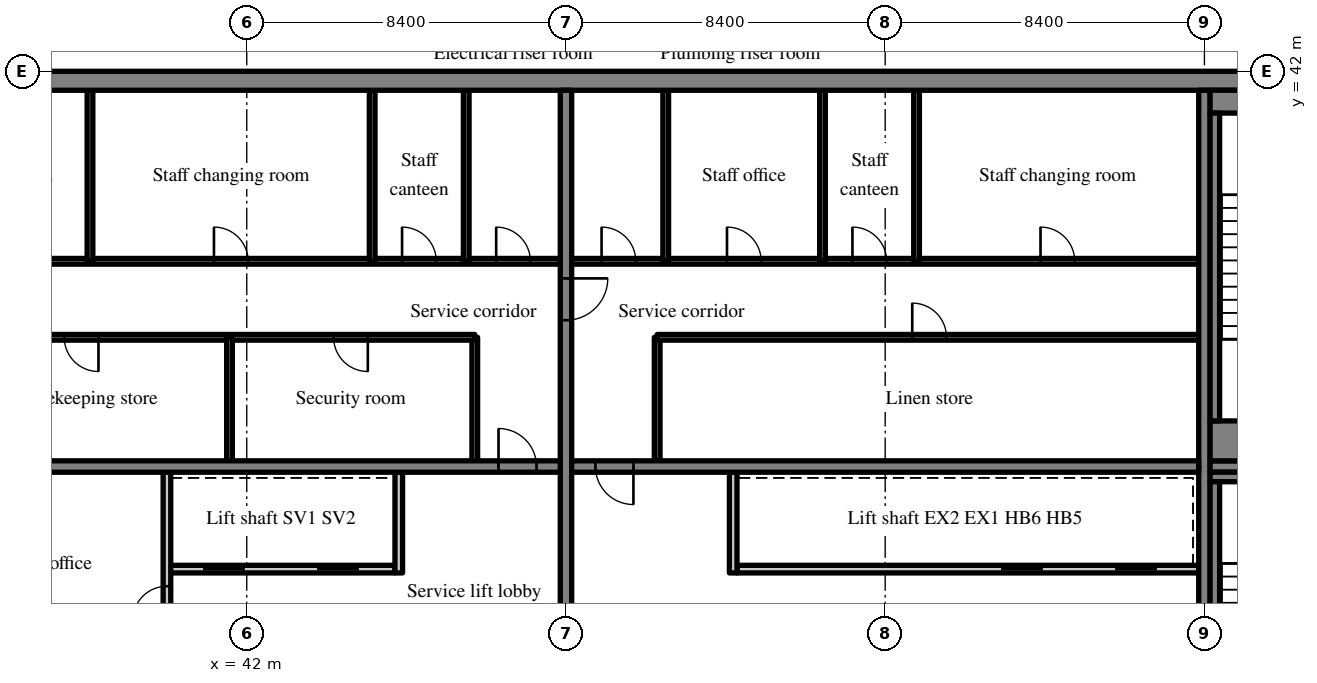
"""IFC4 building model, lengths in metres.
Left out: names, types, materials, properties, quantities, classifications, styles, units other than length and angle.
Written with IfcOpenShell. Run it as: python <this file> out.ifc"""

import sys

from ifc_helpers import new_model, si_unit, direction, frame, frame_2d, origin, place, context, subcontext, project, spatial, rectangle, extrude, source, transform, mapped, element, fill, save


model = new_model("IFC4")
c1 = context("Model", 3, precision=1e-05, world=origin(), true_north=direction((0.0, 1.0)))
c2 = subcontext(c1, "Body", "Model", "MODEL_VIEW")
j1 = project(units=[si_unit("LENGTHUNIT", "METRE"), si_unit("PLANEANGLEUNIT", "RADIAN")], contexts=[c1])
p1 = place(None, origin())
s1 = spatial("IfcSite", under=j1, at=p1, CompositionType="ELEMENT")
p2 = place(p1, origin())
s2 = spatial("IfcBuilding", under=s1, at=p2, CompositionType="ELEMENT")
p3 = place(p2, frame((0.0, 0.0, 305.7)))
s3 = spatial("IfcBuildingStorey", under=s2, at=p3, CompositionType="ELEMENT", Elevation=305.7)
m1 = source(origin(), c2, "Body", "SweptSolid", [
    extrude(rectangle(XDim=50.4, YDim=0.5, at=frame_2d((25.2, 0.0))), origin(), (0.0, 0.0, 1.0), 3.72),
])
p4 = place(p3, frame((25.2, 41.75, 0.0), z_axis=(0.0, 0.0, 1.0), x_axis=(1.0, 0.0, 0.0)))
e1 = element("IfcWall", 1, at=p4, inside=s3, PredefinedType="SHEAR", context=c2, shape_type="MappedRepresentation", body=[
    mapped(m1, transform((0.0, 0.0, 0.0), scale=1.0)),
])
m2 = source(origin(), c2, "Body", "SweptSolid", [
    extrude(rectangle(XDim=19.0, YDim=0.3, at=frame_2d((9.5, 0.0))), origin(), (0.0, 0.0, 1.0), 3.72),
])
p5 = place(p3, frame((50.4, 22.5, 0.0), z_axis=(0.0, 0.0, 1.0), x_axis=(0.0, 1.0, 0.0)))
e2 = element("IfcWall", 2, at=p5, inside=s3, PredefinedType="SHEAR", context=c2, shape_type="MappedRepresentation", body=[
    mapped(m2, transform((0.0, 0.0, 0.0), scale=1.0)),
])
m3 = source(origin(), c2, "Body", "SweptSolid", [
    extrude(rectangle(XDim=1.1, YDim=2.1, at=frame_2d((0.55, 1.05))), frame((0.0, 0.16, 0.0), z_axis=(0.0, -1.0, 0.0), x_axis=(1.0, 0.0, 0.0)), (0.0, 0.0, 1.0), 0.32),
])
p6 = place(p5, frame((12.95, 0.0, 0.0)))
e3 = element("IfcOpeningElement", 3, at=p6, cuts=e2, PredefinedType="OPENING", context=c2, shape_type="MappedRepresentation", body=[
    mapped(m3, transform((0.0, 0.0, 0.0), scale=1.0)),
])
p7 = place(p3, frame((67.2, 22.5, 0.0), z_axis=(0.0, 0.0, 1.0), x_axis=(0.0, 1.0, 0.0)))
e4 = element("IfcWall", 4, at=p7, inside=s3, PredefinedType="SHEAR", context=c2, shape_type="MappedRepresentation", body=[
    mapped(m2, transform((0.0, 0.0, 0.0), scale=1.0)),
])
m4 = source(origin(), c2, "Body", "SweptSolid", [
    extrude(rectangle(XDim=16.5, YDim=0.3, at=frame_2d((8.25, 0.0))), origin(), (0.0, 0.0, 1.0), 3.72),
])
p8 = place(p3, frame((33.75, 31.6, 0.0), z_axis=(0.0, 0.0, 1.0), x_axis=(1.0, 0.0, 0.0)))
e5 = element("IfcWall", 5, at=p8, inside=s3, PredefinedType="SHEAR", context=c2, shape_type="MappedRepresentation", body=[
    mapped(m4, transform((0.0, 0.0, 0.0), scale=1.0)),
])
m5 = source(origin(), c2, "Body", "SweptSolid", [
    extrude(rectangle(XDim=1.0, YDim=2.1, at=frame_2d((0.5, 1.05))), frame((0.0, 0.16, 0.0), z_axis=(0.0, -1.0, 0.0), x_axis=(1.0, 0.0, 0.0)), (0.0, 0.0, 1.0), 0.32),
])
p9 = place(p8, frame((14.875, 0.0, 0.0)))
e6 = element("IfcOpeningElement", 6, at=p9, cuts=e5, PredefinedType="OPENING", context=c2, shape_type="MappedRepresentation", body=[
    mapped(m5, transform((0.0, 0.0, 0.0), scale=1.0)),
])
p10 = place(p3, frame((50.55, 31.6, 0.0), z_axis=(0.0, 0.0, 1.0), x_axis=(1.0, 0.0, 0.0)))
e7 = element("IfcWall", 7, at=p10, inside=s3, PredefinedType="SHEAR", context=c2, shape_type="MappedRepresentation", body=[
    mapped(m4, transform((0.0, 0.0, 0.0), scale=1.0)),
])
p11 = place(p10, frame((0.625, 0.0, 0.0)))
e8 = element("IfcOpeningElement", 8, at=p11, cuts=e7, PredefinedType="OPENING", context=c2, shape_type="MappedRepresentation", body=[
    mapped(m5, transform((0.0, 0.0, 0.0), scale=1.0)),
])
m6 = source(origin(), c2, "Body", "SweptSolid", [
    extrude(rectangle(XDim=7.75, YDim=0.3, at=frame_2d((3.875, 0.0))), origin(), (0.0, 0.0, 1.0), 3.72),
])
p12 = place(p3, frame((67.35, 31.6, 0.0), z_axis=(0.0, 0.0, 1.0), x_axis=(1.0, 0.0, 0.0)))
e9 = element("IfcWall", 9, at=p12, inside=s3, PredefinedType="SHEAR", context=c2, shape_type="MappedRepresentation", body=[
    mapped(m6, transform((0.0, 0.0, 0.0), scale=1.0)),
])
p13 = place(p12, frame((5.875, 0.0, 0.0)))
e10 = element("IfcOpeningElement", 10, at=p13, cuts=e9, PredefinedType="OPENING", context=c2, shape_type="MappedRepresentation", body=[
    mapped(m3, transform((0.0, 0.0, 0.0), scale=1.0)),
])
m7 = source(origin(), c2, "Body", "SweptSolid", [
    extrude(rectangle(XDim=6.0, YDim=0.2, at=frame_2d((3.0, 0.0))), origin(), (0.0, 0.0, 1.0), 3.72),
])
p14 = place(p3, frame((39.9, 28.9, 0.0), z_axis=(0.0, 0.0, 1.0), x_axis=(1.0, 0.0, 0.0)))
e11 = element("IfcWall", 11, at=p14, inside=s3, PredefinedType="SOLIDWALL", context=c2, shape_type="MappedRepresentation", body=[
    mapped(m7, transform((0.0, 0.0, 0.0), scale=1.0)),
])
m8 = source(origin(), c2, "Body", "SweptSolid", [
    extrude(rectangle(XDim=1.1, YDim=2.1, at=frame_2d((0.55, 1.05))), frame((0.0, 0.11, 0.0), z_axis=(0.0, -1.0, 0.0), x_axis=(1.0, 0.0, 0.0)), (0.0, 0.0, 1.0), 0.22),
])
p15 = place(p14, frame((0.95, 0.0, 0.0)))
e12 = element("IfcOpeningElement", 12, at=p15, cuts=e11, PredefinedType="OPENING", context=c2, shape_type="MappedRepresentation", body=[
    mapped(m8, transform((0.0, 0.0, 0.0), scale=1.0)),
])
p16 = place(p14, frame((3.95, 0.0, 0.0)))
e13 = element("IfcOpeningElement", 13, at=p16, cuts=e11, PredefinedType="OPENING", context=c2, shape_type="MappedRepresentation", body=[
    mapped(m8, transform((0.0, 0.0, 0.0), scale=1.0)),
])
m9 = source(origin(), c2, "Body", "SweptSolid", [
    extrude(rectangle(XDim=8.95, YDim=0.2, at=frame_2d((4.475, 0.0))), origin(), (0.0, 0.0, 1.0), 3.72),
])
p17 = place(p3, frame((39.9, 22.5, 0.0), z_axis=(0.0, 0.0, 1.0), x_axis=(0.0, 1.0, 0.0)))
e14 = element("IfcWall", 14, at=p17, inside=s3, PredefinedType="PARTITIONING", context=c2, shape_type="MappedRepresentation", body=[
    mapped(m9, transform((0.0, 0.0, 0.0), scale=1.0)),
])
m10 = source(origin(), c2, "Body", "SweptSolid", [
    extrude(rectangle(XDim=0.9, YDim=2.1, at=frame_2d((0.45, 1.05))), frame((0.0, 0.11, 0.0), z_axis=(0.0, -1.0, 0.0), x_axis=(1.0, 0.0, 0.0)), (0.0, 0.0, 1.0), 0.22),
])
p18 = place(p17, frame((5.05, 0.0, 0.0)))
e15 = element("IfcOpeningElement", 15, at=p18, cuts=e14, PredefinedType="OPENING", context=c2, shape_type="MappedRepresentation", body=[
    mapped(m10, transform((0.0, 0.0, 0.0), scale=1.0)),
])
m11 = source(origin(), c2, "Body", "SweptSolid", [
    extrude(rectangle(XDim=2.65, YDim=0.2, at=frame_2d((1.325, 0.0))), origin(), (0.0, 0.0, 1.0), 3.72),
])
p19 = place(p3, frame((46.0, 28.8, 0.0), z_axis=(0.0, 0.0, 1.0), x_axis=(0.0, 1.0, 0.0)))
e16 = element("IfcWall", 16, at=p19, inside=s3, PredefinedType="SOLIDWALL", context=c2, shape_type="MappedRepresentation", body=[
    mapped(m11, transform((0.0, 0.0, 0.0), scale=1.0)),
])
m12 = source(origin(), c2, "Body", "SweptSolid", [
    extrude(rectangle(XDim=3.25, YDim=0.15, at=frame_2d((1.625, 0.0))), origin(), (0.0, 0.0, 1.0), 3.72),
])
p20 = place(p3, frame((48.0, 31.75, 0.0), z_axis=(0.0, 0.0, 1.0), x_axis=(0.0, 1.0, 0.0)))
e17 = element("IfcWall", 17, at=p20, inside=s3, PredefinedType="PARTITIONING", context=c2, shape_type="MappedRepresentation", body=[
    mapped(m12, transform((0.0, 0.0, 0.0), scale=1.0)),
])
m13 = source(origin(), c2, "Body", "SweptSolid", [
    extrude(rectangle(XDim=14.25, YDim=0.15, at=frame_2d((7.125, 0.0))), origin(), (0.0, 0.0, 1.0), 3.72),
])
p21 = place(p3, frame((33.75, 35.0, 0.0), z_axis=(0.0, 0.0, 1.0), x_axis=(1.0, 0.0, 0.0)))
e18 = element("IfcWall", 18, at=p21, inside=s3, PredefinedType="PARTITIONING", context=c2, shape_type="MappedRepresentation", body=[
    mapped(m13, transform((0.0, 0.0, 0.0), scale=1.0)),
])
m14 = source(origin(), c2, "Body", "SweptSolid", [
    extrude(rectangle(XDim=0.9, YDim=2.1, at=frame_2d((0.45, 1.05))), frame((0.0, 0.085, 0.0), z_axis=(0.0, -1.0, 0.0), x_axis=(1.0, 0.0, 0.0)), (0.0, 0.0, 1.0), 0.17),
])
p22 = place(p21, frame((3.448, 0.0, 0.0)))
e19 = element("IfcOpeningElement", 19, at=p22, cuts=e18, PredefinedType="OPENING", context=c2, shape_type="MappedRepresentation", body=[
    mapped(m14, transform((0.0, 0.0, 0.0), scale=1.0)),
])
p23 = place(p21, frame((10.536, 0.0, 0.0)))
e20 = element("IfcOpeningElement", 20, at=p23, cuts=e18, PredefinedType="OPENING", context=c2, shape_type="MappedRepresentation", body=[
    mapped(m14, transform((0.0, 0.0, 0.0), scale=1.0)),
])
m15 = source(origin(), c2, "Body", "SweptSolid", [
    extrude(rectangle(XDim=16.5, YDim=0.15, at=frame_2d((8.25, 0.0))), origin(), (0.0, 0.0, 1.0), 3.72),
])
p24 = place(p3, frame((33.75, 37.0, 0.0), z_axis=(0.0, 0.0, 1.0), x_axis=(1.0, 0.0, 0.0)))
e21 = element("IfcWall", 21, at=p24, inside=s3, PredefinedType="PARTITIONING", context=c2, shape_type="MappedRepresentation", body=[
    mapped(m15, transform((0.0, 0.0, 0.0), scale=1.0)),
])
p25 = place(p24, frame((1.612, 0.0, 0.0)))
e22 = element("IfcOpeningElement", 22, at=p25, cuts=e21, PredefinedType="OPENING", context=c2, shape_type="MappedRepresentation", body=[
    mapped(m14, transform((0.0, 0.0, 0.0), scale=1.0)),
])
p26 = place(p24, frame((7.387, 0.0, 0.0)))
e23 = element("IfcOpeningElement", 23, at=p26, cuts=e21, PredefinedType="OPENING", context=c2, shape_type="MappedRepresentation", body=[
    mapped(m14, transform((0.0, 0.0, 0.0), scale=1.0)),
])
p27 = place(p24, frame((12.337, 0.0, 0.0)))
e24 = element("IfcOpeningElement", 24, at=p27, cuts=e21, PredefinedType="OPENING", context=c2, shape_type="MappedRepresentation", body=[
    mapped(m14, transform((0.0, 0.0, 0.0), scale=1.0)),
])
p28 = place(p24, frame((14.813, 0.0, 0.0)))
e25 = element("IfcOpeningElement", 25, at=p28, cuts=e21, PredefinedType="OPENING", context=c2, shape_type="MappedRepresentation", body=[
    mapped(m14, transform((0.0, 0.0, 0.0), scale=1.0)),
])
p29 = place(p3, frame((41.546, 31.75, 0.0), z_axis=(0.0, 0.0, 1.0), x_axis=(0.0, 1.0, 0.0)))
e26 = element("IfcWall", 26, at=p29, inside=s3, PredefinedType="PARTITIONING", context=c2, shape_type="MappedRepresentation", body=[
    mapped(m12, transform((0.0, 0.0, 0.0), scale=1.0)),
])
m16 = source(origin(), c2, "Body", "SweptSolid", [
    extrude(rectangle(XDim=4.5, YDim=0.15, at=frame_2d((2.25, 0.0))), origin(), (0.0, 0.0, 1.0), 3.72),
])
for number, where, z_axis, x_axis in (
    (27, (37.875, 37.0, 0.0), (0.0, 0.0, 1.0), (0.0, 1.0, 0.0)),
    (28, (45.3, 37.0, 0.0), (0.0, 0.0, 1.0), (0.0, 1.0, 0.0)),
    (29, (47.775, 37.0, 0.0), (0.0, 0.0, 1.0), (0.0, 1.0, 0.0)),
):
    element("IfcWall", number, at=place(p3, frame(where, z_axis=z_axis, x_axis=x_axis)), inside=s3, PredefinedType="PARTITIONING", context=c2, shape_type="MappedRepresentation", body=[
        mapped(m16, transform((0.0, 0.0, 0.0), scale=1.0)),
    ])
m17 = source(origin(), c2, "Body", "SweptSolid", [
    extrude(rectangle(XDim=12.15, YDim=0.2, at=frame_2d((6.075, 0.0))), origin(), (0.0, 0.0, 1.0), 3.72),
])
p30 = place(p3, frame((67.05, 28.9, 0.0), z_axis=(0.0, 0.0, 1.0), x_axis=(-1.0, 0.0, 0.0)))
e30 = element("IfcWall", 30, at=p30, inside=s3, PredefinedType="SOLIDWALL", context=c2, shape_type="MappedRepresentation", body=[
    mapped(m17, transform((0.0, 0.0, 0.0), scale=1.0)),
])
p31 = place(p30, frame((1.1, 0.0, 0.0)))
e31 = element("IfcOpeningElement", 31, at=p31, cuts=e30, PredefinedType="OPENING", context=c2, shape_type="MappedRepresentation", body=[
    mapped(m8, transform((0.0, 0.0, 0.0), scale=1.0)),
])
p32 = place(p30, frame((4.1, 0.0, 0.0)))
e32 = element("IfcOpeningElement", 32, at=p32, cuts=e30, PredefinedType="OPENING", context=c2, shape_type="MappedRepresentation", body=[
    mapped(m8, transform((0.0, 0.0, 0.0), scale=1.0)),
])
p33 = place(p3, frame((54.8, 28.8, 0.0), z_axis=(0.0, 0.0, 1.0), x_axis=(0.0, 1.0, 0.0)))
e33 = element("IfcWall", 33, at=p33, inside=s3, PredefinedType="SOLIDWALL", context=c2, shape_type="MappedRepresentation", body=[
    mapped(m11, transform((0.0, 0.0, 0.0), scale=1.0)),
])
p34 = place(p3, frame((52.8, 31.75, 0.0), z_axis=(0.0, 0.0, 1.0), x_axis=(0.0, 1.0, 0.0)))
e34 = element("IfcWall", 34, at=p34, inside=s3, PredefinedType="PARTITIONING", context=c2, shape_type="MappedRepresentation", body=[
    mapped(m12, transform((0.0, 0.0, 0.0), scale=1.0)),
])
p35 = place(p3, frame((67.05, 35.0, 0.0), z_axis=(0.0, 0.0, 1.0), x_axis=(-1.0, 0.0, 0.0)))
e35 = element("IfcWall", 35, at=p35, inside=s3, PredefinedType="PARTITIONING", context=c2, shape_type="MappedRepresentation", body=[
    mapped(m13, transform((0.0, 0.0, 0.0), scale=1.0)),
])
p36 = place(p35, frame((6.638, 0.0, 0.0)))
e36 = element("IfcOpeningElement", 36, at=p36, cuts=e35, PredefinedType="OPENING", context=c2, shape_type="MappedRepresentation", body=[
    mapped(m14, transform((0.0, 0.0, 0.0), scale=1.0)),
])
p37 = place(p3, frame((67.05, 37.0, 0.0), z_axis=(0.0, 0.0, 1.0), x_axis=(-1.0, 0.0, 0.0)))
e37 = element("IfcWall", 37, at=p37, inside=s3, PredefinedType="PARTITIONING", context=c2, shape_type="MappedRepresentation", body=[
    mapped(m15, transform((0.0, 0.0, 0.0), scale=1.0)),
])
p38 = place(p37, frame((3.263, 0.0, 0.0)))
e38 = element("IfcOpeningElement", 38, at=p38, cuts=e37, PredefinedType="OPENING", context=c2, shape_type="MappedRepresentation", body=[
    mapped(m14, transform((0.0, 0.0, 0.0), scale=1.0)),
])
p39 = place(p37, frame((8.212, 0.0, 0.0)))
e39 = element("IfcOpeningElement", 39, at=p39, cuts=e37, PredefinedType="OPENING", context=c2, shape_type="MappedRepresentation", body=[
    mapped(m14, transform((0.0, 0.0, 0.0), scale=1.0)),
])
p40 = place(p37, frame((11.513, 0.0, 0.0)))
e40 = element("IfcOpeningElement", 40, at=p40, cuts=e37, PredefinedType="OPENING", context=c2, shape_type="MappedRepresentation", body=[
    mapped(m14, transform((0.0, 0.0, 0.0), scale=1.0)),
])
p41 = place(p37, frame((14.813, 0.0, 0.0)))
e41 = element("IfcOpeningElement", 41, at=p41, cuts=e37, PredefinedType="OPENING", context=c2, shape_type="MappedRepresentation", body=[
    mapped(m14, transform((0.0, 0.0, 0.0), scale=1.0)),
])
for number, where, z_axis, x_axis in (
    (42, (59.625, 37.0, 0.0), (0.0, 0.0, 1.0), (0.0, 1.0, 0.0)),
    (43, (57.15, 37.0, 0.0), (0.0, 0.0, 1.0), (0.0, 1.0, 0.0)),
    (44, (53.025, 37.0, 0.0), (0.0, 0.0, 1.0), (0.0, 1.0, 0.0)),
):
    element("IfcWall", number, at=place(p3, frame(where, z_axis=z_axis, x_axis=x_axis)), inside=s3, PredefinedType="PARTITIONING", context=c2, shape_type="MappedRepresentation", body=[
        mapped(m16, transform((0.0, 0.0, 0.0), scale=1.0)),
    ])
m18 = source(origin(), c2, "Body", "SweptSolid", [
    extrude(rectangle(XDim=4.9, YDim=0.25, at=frame_2d((2.45, 0.0))), origin(), (0.0, 0.0, 1.0), 3.72),
])
p42 = place(p3, frame((67.35, 31.325, 0.0), z_axis=(0.0, 0.0, 1.0), x_axis=(1.0, 0.0, 0.0)))
e45 = element("IfcWall", 45, at=p42, inside=s3, PredefinedType="SOLIDWALL", context=c2, shape_type="MappedRepresentation", body=[
    mapped(m18, transform((0.0, 0.0, 0.0), scale=1.0)),
])
m19 = source(origin(), c2, "Body", "SweptSolid", [
    extrude(rectangle(XDim=8.1, YDim=0.25, at=frame_2d((4.05, 0.0))), origin(), (0.0, 0.0, 1.0), 3.72),
])
p43 = place(p3, frame((67.475, 23.1, 0.0), z_axis=(0.0, 0.0, 1.0), x_axis=(0.0, 1.0, 0.0)))
e46 = element("IfcWall", 46, at=p43, inside=s3, PredefinedType="SOLIDWALL", context=c2, shape_type="MappedRepresentation", body=[
    mapped(m19, transform((0.0, 0.0, 0.0), scale=1.0)),
])
m20 = source(origin(), c2, "Body", "SweptSolid", [
    extrude(rectangle(XDim=4.9, YDim=0.6, at=frame_2d((2.45, 0.0))), origin(), (0.0, 0.0, 1.0), 3.72),
])
p44 = place(p3, frame((67.35, 41.2, 0.0), z_axis=(0.0, 0.0, 1.0), x_axis=(1.0, 0.0, 0.0)))
e47 = element("IfcWall", 47, at=p44, inside=s3, PredefinedType="SOLIDWALL", context=c2, shape_type="MappedRepresentation", body=[
    mapped(m20, transform((0.0, 0.0, 0.0), scale=1.0)),
])
m21 = source(origin(), c2, "Body", "SweptSolid", [
    extrude(rectangle(XDim=4.9, YDim=1.05, at=frame_2d((2.45, 0.0))), origin(), (0.0, 0.0, 1.0), 3.72),
])
p45 = place(p3, frame((67.35, 32.275, 0.0), z_axis=(0.0, 0.0, 1.0), x_axis=(1.0, 0.0, 0.0)))
e48 = element("IfcWall", 48, at=p45, inside=s3, PredefinedType="SOLIDWALL", context=c2, shape_type="MappedRepresentation", body=[
    mapped(m21, transform((0.0, 0.0, 0.0), scale=1.0)),
])
p46 = place(p3, frame((67.475, 32.8, 0.0), z_axis=(0.0, 0.0, 1.0), x_axis=(0.0, 1.0, 0.0)))
e49 = element("IfcWall", 49, at=p46, inside=s3, PredefinedType="SOLIDWALL", context=c2, shape_type="MappedRepresentation", body=[
    mapped(m19, transform((0.0, 0.0, 0.0), scale=1.0)),
])
m22 = source(origin(), c2, "Body", "SweptSolid", [
    extrude(rectangle(XDim=1.0, YDim=2.1, at=frame_2d((0.5, 1.05))), frame((0.0, 0.025, 0.0), z_axis=(0.0, -1.0, 0.0), x_axis=(1.0, 0.0, 0.0)), (0.0, 0.0, 1.0), 0.05),
])
p47 = place(p9, origin())
e50 = element("IfcDoor", 50, at=p47, inside=s3, OperationType="SINGLE_SWING_LEFT", PredefinedType="DOOR", context=c2, shape_type="MappedRepresentation", body=[
    mapped(m22, transform((0.0, 0.0, 0.0), scale=1.0)),
])
fill(e6, e50)
m23 = source(origin(), c2, "Body", "SweptSolid", [
    extrude(rectangle(XDim=1.1, YDim=2.1, at=frame_2d((0.55, 1.05))), frame((0.0, 0.025, 0.0), z_axis=(0.0, -1.0, 0.0), x_axis=(1.0, 0.0, 0.0)), (0.0, 0.0, 1.0), 0.05),
])
p48 = place(p15, origin())
e51 = element("IfcDoor", 51, at=p48, inside=s3, OperationType="SLIDING_TO_LEFT", PredefinedType="DOOR", context=c2, shape_type="MappedRepresentation", body=[
    mapped(m23, transform((0.0, 0.0, 0.0), scale=1.0)),
])
fill(e12, e51)
p49 = place(p16, origin())
e52 = element("IfcDoor", 52, at=p49, inside=s3, OperationType="SLIDING_TO_RIGHT", PredefinedType="DOOR", context=c2, shape_type="MappedRepresentation", body=[
    mapped(m23, transform((0.0, 0.0, 0.0), scale=1.0)),
])
fill(e13, e52)
m24 = source(origin(), c2, "Body", "SweptSolid", [
    extrude(rectangle(XDim=0.9, YDim=2.1, at=frame_2d((0.45, 1.05))), frame((0.0, 0.025, 0.0), z_axis=(0.0, -1.0, 0.0), x_axis=(1.0, 0.0, 0.0)), (0.0, 0.0, 1.0), 0.05),
])
p50 = place(p18, origin())
e53 = element("IfcDoor", 53, at=p50, inside=s3, OperationType="SINGLE_SWING_LEFT", PredefinedType="DOOR", context=c2, shape_type="MappedRepresentation", body=[
    mapped(m24, transform((0.0, 0.0, 0.0), scale=1.0)),
])
fill(e15, e53)
p51 = place(p22, origin())
e54 = element("IfcDoor", 54, at=p51, inside=s3, OperationType="SINGLE_SWING_RIGHT", PredefinedType="DOOR", context=c2, shape_type="MappedRepresentation", body=[
    mapped(m24, transform((0.0, 0.0, 0.0), scale=1.0)),
])
fill(e19, e54)
p52 = place(p23, origin())
e55 = element("IfcDoor", 55, at=p52, inside=s3, OperationType="SINGLE_SWING_RIGHT", PredefinedType="DOOR", context=c2, shape_type="MappedRepresentation", body=[
    mapped(m24, transform((0.0, 0.0, 0.0), scale=1.0)),
])
fill(e20, e55)
p53 = place(p26, origin())
e56 = element("IfcDoor", 56, at=p53, inside=s3, OperationType="SINGLE_SWING_LEFT", PredefinedType="DOOR", context=c2, shape_type="MappedRepresentation", body=[
    mapped(m24, transform((0.0, 0.0, 0.0), scale=1.0)),
])
fill(e23, e56)
p54 = place(p27, origin())
e57 = element("IfcDoor", 57, at=p54, inside=s3, OperationType="SINGLE_SWING_LEFT", PredefinedType="DOOR", context=c2, shape_type="MappedRepresentation", body=[
    mapped(m24, transform((0.0, 0.0, 0.0), scale=1.0)),
])
fill(e24, e57)
p55 = place(p28, origin())
e58 = element("IfcDoor", 58, at=p55, inside=s3, OperationType="SINGLE_SWING_LEFT", PredefinedType="DOOR", context=c2, shape_type="MappedRepresentation", body=[
    mapped(m24, transform((0.0, 0.0, 0.0), scale=1.0)),
])
fill(e25, e58)
p56 = place(p11, origin())
e59 = element("IfcDoor", 59, at=p56, inside=s3, OperationType="SINGLE_SWING_RIGHT", PredefinedType="DOOR", context=c2, shape_type="MappedRepresentation", body=[
    mapped(m22, transform((0.0, 0.0, 0.0), scale=1.0)),
])
fill(e8, e59)
p57 = place(p31, origin())
e60 = element("IfcDoor", 60, at=p57, inside=s3, OperationType="SLIDING_TO_RIGHT", PredefinedType="DOOR", context=c2, shape_type="MappedRepresentation", body=[
    mapped(m23, transform((0.0, 0.0, 0.0), scale=1.0)),
])
fill(e31, e60)
p58 = place(p32, origin())
e61 = element("IfcDoor", 61, at=p58, inside=s3, OperationType="SLIDING_TO_LEFT", PredefinedType="DOOR", context=c2, shape_type="MappedRepresentation", body=[
    mapped(m23, transform((0.0, 0.0, 0.0), scale=1.0)),
])
fill(e32, e61)
p59 = place(p36, origin())
e62 = element("IfcDoor", 62, at=p59, inside=s3, OperationType="SINGLE_SWING_RIGHT", PredefinedType="DOOR", context=c2, shape_type="MappedRepresentation", body=[
    mapped(m24, transform((0.0, 0.0, 0.0), scale=1.0)),
])
fill(e36, e62)
p60 = place(p38, origin())
e63 = element("IfcDoor", 63, at=p60, inside=s3, OperationType="SINGLE_SWING_RIGHT", PredefinedType="DOOR", context=c2, shape_type="MappedRepresentation", body=[
    mapped(m24, transform((0.0, 0.0, 0.0), scale=1.0)),
])
fill(e38, e63)
p61 = place(p39, origin())
e64 = element("IfcDoor", 64, at=p61, inside=s3, OperationType="SINGLE_SWING_RIGHT", PredefinedType="DOOR", context=c2, shape_type="MappedRepresentation", body=[
    mapped(m24, transform((0.0, 0.0, 0.0), scale=1.0)),
])
fill(e39, e64)
p62 = place(p40, origin())
e65 = element("IfcDoor", 65, at=p62, inside=s3, OperationType="SINGLE_SWING_RIGHT", PredefinedType="DOOR", context=c2, shape_type="MappedRepresentation", body=[
    mapped(m24, transform((0.0, 0.0, 0.0), scale=1.0)),
])
fill(e40, e65)
p63 = place(p41, origin())
e66 = element("IfcDoor", 66, at=p63, inside=s3, OperationType="SINGLE_SWING_RIGHT", PredefinedType="DOOR", context=c2, shape_type="MappedRepresentation", body=[
    mapped(m24, transform((0.0, 0.0, 0.0), scale=1.0)),
])
fill(e41, e66)
p64 = place(p6, origin())
e67 = element("IfcDoor", 67, at=p64, inside=s3, OperationType="SINGLE_SWING_RIGHT", PredefinedType="DOOR", context=c2, shape_type="MappedRepresentation", body=[
    mapped(m23, transform((0.0, 0.0, 0.0), scale=1.0)),
])
fill(e3, e67)
save(model, sys.argv[1])
